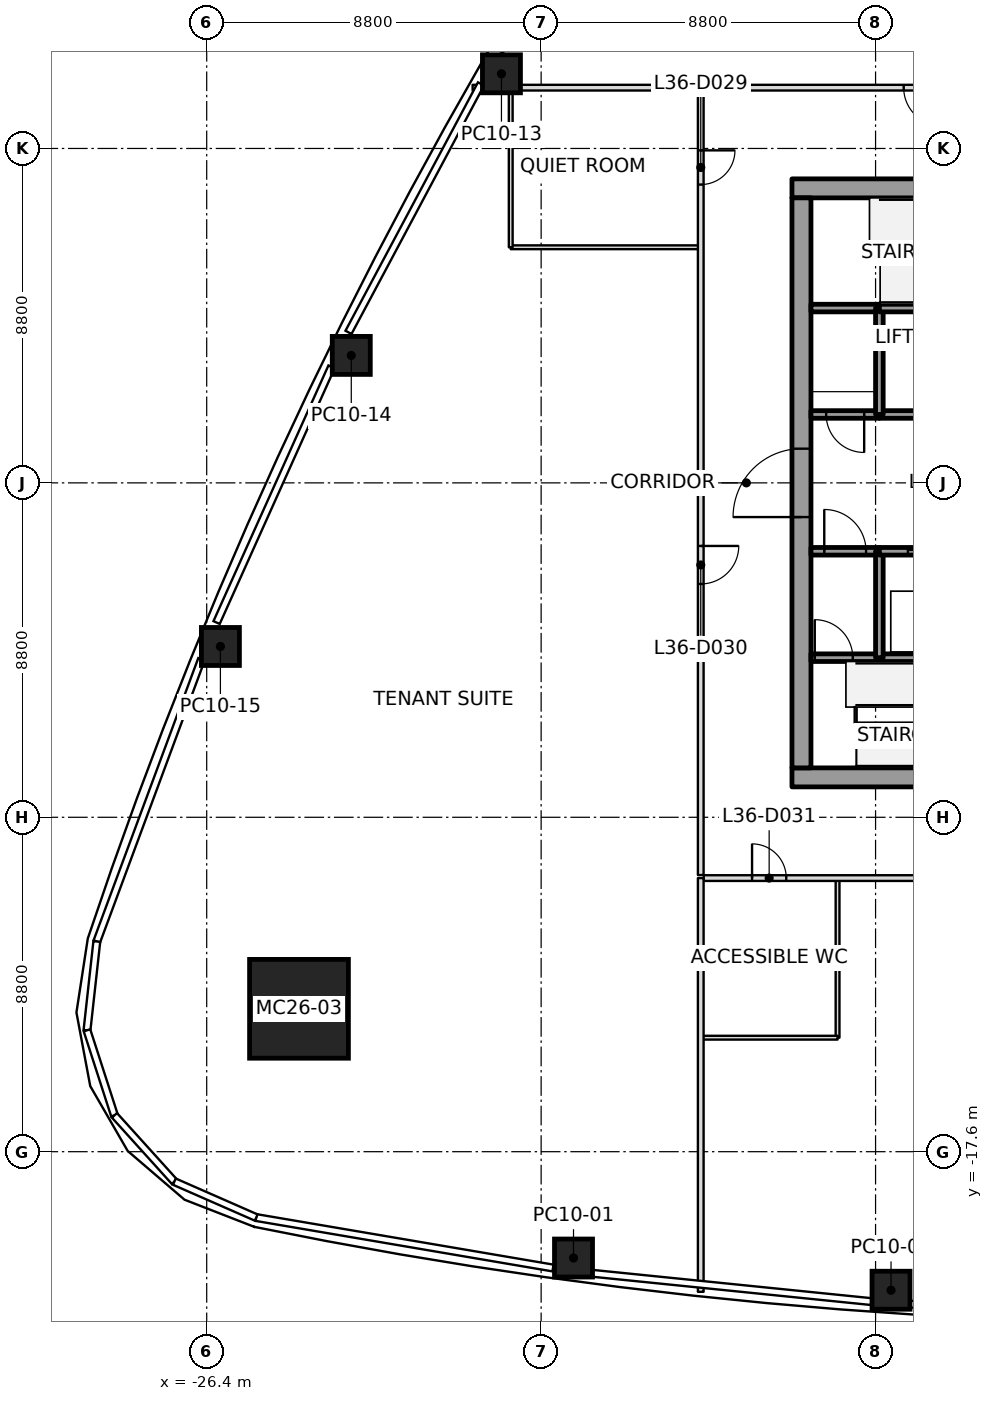
"""IFC4 building model, lengths in metres.
Left out: names, types, materials, properties, quantities, classifications, styles, units other than length and angle.
Written with IfcOpenShell. Run it as: python <this file> out.ifc"""

import sys

from ifc_helpers import new_model, si_unit, direction, frame, frame_2d, origin, origin_2d, place, context, subcontext, project, spatial, rectangle, extrude, element, fill, save


model = new_model("IFC4")
c1 = context("Model", 3, precision=1e-05, world=origin(), true_north=direction((0.0, 1.0)))
c2 = subcontext(c1, "Body", "Model", "MODEL_VIEW")
j1 = project(units=[si_unit("LENGTHUNIT", "METRE"), si_unit("PLANEANGLEUNIT", "RADIAN")], contexts=[c1])
p1 = place(None, origin())
s1 = spatial("IfcSite", under=j1, at=p1, CompositionType="ELEMENT")
p2 = place(p1, origin())
s2 = spatial("IfcBuilding", under=s1, at=p2, CompositionType="ELEMENT")
p3 = place(p2, frame((0.0, 0.0, 165.8)))
s3 = spatial("IfcBuildingStorey", under=s2, at=p3, CompositionType="ELEMENT", Elevation=165.8)
p4 = place(p3, frame((-23.972, -13.84, 0.0), z_axis=(0.02806141744, 0.01622681965, 0.999474485505), x_axis=(0.999606200887, -0.000455526946, -0.028057719863)))
e1 = element("IfcColumn", 1, at=p4, inside=s3, PredefinedType="COLUMN", context=c2, shape_type="SweptSolid", body=[
    extrude(rectangle(XDim=2.6, YDim=2.6, at=origin_2d()), origin(), (0.0, 0.0, 1.0), 4.002),
])
p5 = place(p3, frame((-16.748, -20.398, 0.0), z_axis=(0.017696459735, 0.010434809016, 0.999788952766), x_axis=(-0.990776036146, 0.134545840015, 0.016132672842)))
e2 = element("IfcColumn", 2, at=p5, inside=s3, PredefinedType="COLUMN", context=c2, shape_type="SweptSolid", body=[
    extrude(rectangle(XDim=1.0, YDim=1.0, at=origin_2d()), origin(), (0.0, 0.0, 1.0), 4.001),
])
p6 = place(p3, frame((-8.393, -21.246, 0.0), z_axis=(0.008788174922, 0.01116830563, 0.999899013366), x_axis=(-0.997691697618, 0.067431644192, 0.008015601414)))
e3 = element("IfcColumn", 3, at=p6, inside=s3, PredefinedType="COLUMN", context=c2, shape_type="SweptSolid", body=[
    extrude(rectangle(XDim=1.0, YDim=1.0, at=origin_2d()), origin(), (0.0, 0.0, 1.0), 4.0),
])
p7 = place(p3, frame((-18.644, 10.764, 0.0), z_axis=(0.009887049298, -0.00573692984, 0.999934664812), x_axis=(0.499975560967, 0.866039512843, 2.5126546e-05)))
e4 = element("IfcColumn", 4, at=p7, inside=s3, PredefinedType="COLUMN", context=c2, shape_type="SweptSolid", body=[
    extrude(rectangle(XDim=1.0, YDim=1.0, at=origin_2d()), origin(), (0.0, 0.0, 1.0), 4.0),
])
p8 = place(p3, frame((-22.596, 3.354, 0.0), z_axis=(0.014158708123, 0.002013954173, 0.999897732257), x_axis=(0.440504608639, 0.897714295087, -0.008045754452)))
e5 = element("IfcColumn", 5, at=p8, inside=s3, PredefinedType="COLUMN", context=c2, shape_type="SweptSolid", body=[
    extrude(rectangle(XDim=1.0, YDim=1.0, at=origin_2d()), origin(), (0.0, 0.0, 1.0), 4.0),
])
p9 = place(p3, frame((-26.04, -4.305, 0.0), z_axis=(0.017879535448, 0.010068680372, 0.999789449778), x_axis=(0.379037047043, 0.925241495115, -0.016096356291)))
e6 = element("IfcColumn", 6, at=p9, inside=s3, PredefinedType="COLUMN", context=c2, shape_type="SweptSolid", body=[
    extrude(rectangle(XDim=1.0, YDim=1.0, at=origin_2d()), origin(), (0.0, 0.0, 1.0), 4.001),
])
p10 = place(p3, frame((-11.0, -7.75, 0.0), z_axis=(0.0, 0.0, 1.0), x_axis=(1.0, 0.0, 0.0)))
e7 = element("IfcWall", 7, at=p10, inside=s3, PredefinedType="SHEAR", context=c2, shape_type="SweptSolid", body=[
    extrude(rectangle(XDim=22.0, YDim=0.5, at=frame_2d((11.0, 0.0))), origin(), (0.0, 0.0, 1.0), 4.0),
])
p11 = place(p10, frame((10.45, 0.0, 0.0)))
e8 = element("IfcOpeningElement", 8, at=p11, cuts=e7, PredefinedType="OPENING", context=c2, shape_type="SweptSolid", body=[
    extrude(rectangle(XDim=1.1, YDim=2.1, at=frame_2d((0.55, 1.05))), frame((0.0, 0.25, 0.0), z_axis=(0.0, -1.0, 0.0), x_axis=(1.0, 0.0, 0.0)), (0.0, 0.0, 1.0), 0.5),
])
p12 = place(p3, frame((-11.0, 7.75, 0.0), z_axis=(0.0, 0.0, 1.0), x_axis=(1.0, 0.0, 0.0)))
e9 = element("IfcWall", 9, at=p12, inside=s3, PredefinedType="SHEAR", context=c2, shape_type="SweptSolid", body=[
    extrude(rectangle(XDim=22.0, YDim=0.5, at=frame_2d((11.0, 0.0))), origin(), (0.0, 0.0, 1.0), 4.0),
])
p13 = place(p12, frame((10.45, 0.0, 0.0)))
e10 = element("IfcOpeningElement", 10, at=p13, cuts=e9, PredefinedType="OPENING", context=c2, shape_type="SweptSolid", body=[
    extrude(rectangle(XDim=1.1, YDim=2.1, at=frame_2d((0.55, 1.05))), frame((0.0, 0.25, 0.0), z_axis=(0.0, -1.0, 0.0), x_axis=(1.0, 0.0, 0.0)), (0.0, 0.0, 1.0), 0.5),
])
p14 = place(p3, frame((-10.75, -7.5, 0.0), z_axis=(0.0, 0.0, 1.0), x_axis=(0.0, 1.0, 0.0)))
e11 = element("IfcWall", 11, at=p14, inside=s3, PredefinedType="SHEAR", context=c2, shape_type="SweptSolid", body=[
    extrude(rectangle(XDim=15.0, YDim=0.5, at=frame_2d((7.5, 0.0))), origin(), (0.0, 0.0, 1.0), 4.0),
])
p15 = place(p14, frame((6.6, 0.0, 0.0)))
e12 = element("IfcOpeningElement", 12, at=p15, cuts=e11, PredefinedType="OPENING", context=c2, shape_type="SweptSolid", body=[
    extrude(rectangle(XDim=1.8, YDim=2.1, at=frame_2d((0.9, 1.05))), frame((0.0, 0.25, 0.0), z_axis=(0.0, -1.0, 0.0), x_axis=(1.0, 0.0, 0.0)), (0.0, 0.0, 1.0), 0.5),
])
p16 = place(p3, frame((-10.5, -4.6, 0.0), z_axis=(0.0, 0.0, 1.0), x_axis=(1.0, 0.0, 0.0)))
e13 = element("IfcWall", 13, at=p16, inside=s3, PredefinedType="SOLIDWALL", context=c2, shape_type="SweptSolid", body=[
    extrude(rectangle(XDim=1.8, YDim=0.2, at=frame_2d((0.9, 0.0))), origin(), (0.0, 0.0, 1.0), 3.85),
])
p17 = place(p16, frame((0.1, 0.0, 0.0)))
e14 = element("IfcOpeningElement", 14, at=p17, cuts=e13, PredefinedType="OPENING", context=c2, shape_type="SweptSolid", body=[
    extrude(rectangle(XDim=1.0, YDim=2.1, at=frame_2d((0.5, 1.05))), frame((0.0, 0.1, 0.0), z_axis=(0.0, -1.0, 0.0), x_axis=(1.0, 0.0, 0.0)), (0.0, 0.0, 1.0), 0.2),
])
p18 = place(p3, frame((-10.5, -1.8, 0.0), z_axis=(0.0, 0.0, 1.0), x_axis=(1.0, 0.0, 0.0)))
e15 = element("IfcWall", 15, at=p18, inside=s3, PredefinedType="SOLIDWALL", context=c2, shape_type="SweptSolid", body=[
    extrude(rectangle(XDim=1.8, YDim=0.2, at=frame_2d((0.9, 0.0))), origin(), (0.0, 0.0, 1.0), 3.85),
])
p19 = place(p18, frame((0.35, 0.0, 0.0)))
e16 = element("IfcOpeningElement", 16, at=p19, cuts=e15, PredefinedType="OPENING", context=c2, shape_type="SweptSolid", body=[
    extrude(rectangle(XDim=1.1, YDim=2.1, at=frame_2d((0.55, 1.05))), frame((0.0, 0.1, 0.0), z_axis=(0.0, -1.0, 0.0), x_axis=(1.0, 0.0, 0.0)), (0.0, 0.0, 1.0), 0.2),
])
p20 = place(p3, frame((-8.7, 1.8, 0.0), z_axis=(0.0, 0.0, 1.0), x_axis=(-1.0, 0.0, 0.0)))
e17 = element("IfcWall", 17, at=p20, inside=s3, PredefinedType="SOLIDWALL", context=c2, shape_type="SweptSolid", body=[
    extrude(rectangle(XDim=1.8, YDim=0.2, at=frame_2d((0.9, 0.0))), origin(), (0.0, 0.0, 1.0), 3.85),
])
p21 = place(p20, frame((0.4, 0.0, 0.0)))
e18 = element("IfcOpeningElement", 18, at=p21, cuts=e17, PredefinedType="OPENING", context=c2, shape_type="SweptSolid", body=[
    extrude(rectangle(XDim=1.0, YDim=2.1, at=frame_2d((0.5, 1.05))), frame((0.0, 0.1, 0.0), z_axis=(0.0, -1.0, 0.0), x_axis=(1.0, 0.0, 0.0)), (0.0, 0.0, 1.0), 0.2),
])
p22 = place(p3, frame((-8.7, 4.6, 0.0), z_axis=(0.0, 0.0, 1.0), x_axis=(-1.0, 0.0, 0.0)))
e19 = element("IfcWall", 19, at=p22, inside=s3, PredefinedType="SOLIDWALL", context=c2, shape_type="SweptSolid", body=[
    extrude(rectangle(XDim=1.8, YDim=0.2, at=frame_2d((0.9, 0.0))), origin(), (0.0, 0.0, 1.0), 3.85),
])
p23 = place(p3, frame((-8.7, -4.6, 0.0), z_axis=(0.0, 0.0, 1.0), x_axis=(1.0, 0.0, 0.0)))
e20 = element("IfcWall", 20, at=p23, inside=s3, PredefinedType="SOLIDWALL", context=c2, shape_type="SweptSolid", body=[
    extrude(rectangle(XDim=2.6, YDim=0.2, at=frame_2d((1.3, 0.0))), origin(), (0.0, 0.0, 1.0), 3.85),
])
p24 = place(p3, frame((-8.7, -4.6, 0.0), z_axis=(0.0, 0.0, 1.0), x_axis=(0.0, 1.0, 0.0)))
e21 = element("IfcWall", 21, at=p24, inside=s3, PredefinedType="SOLIDWALL", context=c2, shape_type="SweptSolid", body=[
    extrude(rectangle(XDim=2.8, YDim=0.2, at=frame_2d((1.4, 0.0))), origin(), (0.0, 0.0, 1.0), 3.85),
])
p25 = place(p3, frame((-8.7, -1.8, 0.0), z_axis=(0.0, 0.0, 1.0), x_axis=(1.0, 0.0, 0.0)))
e22 = element("IfcWall", 22, at=p25, inside=s3, PredefinedType="SOLIDWALL", context=c2, shape_type="SweptSolid", body=[
    extrude(rectangle(XDim=2.6, YDim=0.2, at=frame_2d((1.3, 0.0))), origin(), (0.0, 0.0, 1.0), 3.85),
])
p26 = place(p25, frame((0.75, 0.0, 0.0)))
e23 = element("IfcOpeningElement", 23, at=p26, cuts=e22, PredefinedType="OPENING", context=c2, shape_type="SweptSolid", body=[
    extrude(rectangle(XDim=1.1, YDim=2.1, at=frame_2d((0.55, 1.05))), frame((0.0, 0.1, 0.0), z_axis=(0.0, -1.0, 0.0), x_axis=(1.0, 0.0, 0.0)), (0.0, 0.0, 1.0), 0.2),
])
p27 = place(p3, frame((-6.1, 1.8, 0.0), z_axis=(0.0, 0.0, 1.0), x_axis=(-1.0, 0.0, 0.0)))
e24 = element("IfcWall", 24, at=p27, inside=s3, PredefinedType="SOLIDWALL", context=c2, shape_type="SweptSolid", body=[
    extrude(rectangle(XDim=2.6, YDim=0.2, at=frame_2d((1.3, 0.0))), origin(), (0.0, 0.0, 1.0), 3.85),
])
p28 = place(p3, frame((-8.7, 1.8, 0.0), z_axis=(0.0, 0.0, 1.0), x_axis=(0.0, 1.0, 0.0)))
e25 = element("IfcWall", 25, at=p28, inside=s3, PredefinedType="SOLIDWALL", context=c2, shape_type="SweptSolid", body=[
    extrude(rectangle(XDim=2.8, YDim=0.2, at=frame_2d((1.4, 0.0))), origin(), (0.0, 0.0, 1.0), 3.85),
])
p29 = place(p3, frame((-6.1, 4.6, 0.0), z_axis=(0.0, 0.0, 1.0), x_axis=(-1.0, 0.0, 0.0)))
e26 = element("IfcWall", 26, at=p29, inside=s3, PredefinedType="SOLIDWALL", context=c2, shape_type="SweptSolid", body=[
    extrude(rectangle(XDim=2.6, YDim=0.2, at=frame_2d((1.3, 0.0))), origin(), (0.0, 0.0, 1.0), 3.85),
])
p30 = place(p3, frame((-13.4, 10.4, 0.0), z_axis=(0.0, 0.0, 1.0), x_axis=(-1.0, 0.0, 0.0)))
e27 = element("IfcWall", 27, at=p30, inside=s3, PredefinedType="PARTITIONING", context=c2, shape_type="SweptSolid", body=[
    extrude(rectangle(XDim=6.003, YDim=0.15, at=frame_2d((3.001, 0.0))), origin(), (0.0, 0.0, 1.0), 3.234),
])
p31 = place(p3, frame((-13.4, -10.4, 0.0), z_axis=(0.0, 0.0, 1.0), x_axis=(0.0, -1.0, 0.0)))
e28 = element("IfcWall", 28, at=p31, inside=s3, PredefinedType="PARTITIONING", context=c2, shape_type="SweptSolid", body=[
    extrude(rectangle(XDim=10.888, YDim=0.15, at=frame_2d((5.444, 0.0))), origin(), (0.0, 0.0, 1.0), 3.234),
])
p32 = place(p3, frame((-13.4, 10.32, 0.0), z_axis=(0.0, 0.0, 1.0), x_axis=(0.0, -1.0, 0.0)))
e29 = element("IfcWall", 29, at=p32, inside=s3, PredefinedType="PARTITIONING", context=c2, shape_type="SweptSolid", body=[
    extrude(rectangle(XDim=20.64, YDim=0.15, at=frame_2d((10.32, 0.0))), origin(), (0.0, 0.0, 1.0), 3.166),
])
p33 = place(p32, frame((1.57, 0.0, 0.0)))
e30 = element("IfcOpeningElement", 30, at=p33, cuts=e29, PredefinedType="OPENING", context=c2, shape_type="SweptSolid", body=[
    extrude(rectangle(XDim=0.9, YDim=2.1, at=frame_2d((0.45, 1.05))), frame((0.0, 0.075, 0.0), z_axis=(0.0, -1.0, 0.0), x_axis=(1.0, 0.0, 0.0)), (0.0, 0.0, 1.0), 0.15),
])
p34 = place(p32, frame((11.98, 0.0, 0.0)))
e31 = element("IfcOpeningElement", 31, at=p34, cuts=e29, PredefinedType="OPENING", context=c2, shape_type="SweptSolid", body=[
    extrude(rectangle(XDim=1.0, YDim=2.1, at=frame_2d((0.5, 1.05))), frame((0.0, 0.075, 0.0), z_axis=(0.0, -1.0, 0.0), x_axis=(1.0, 0.0, 0.0)), (0.0, 0.0, 1.0), 0.15),
])
p35 = place(p3, frame((-13.32, -10.4, 0.0), z_axis=(0.0, 0.0, 1.0), x_axis=(1.0, 0.0, 0.0)))
e32 = element("IfcWall", 32, at=p35, inside=s3, PredefinedType="PARTITIONING", context=c2, shape_type="SweptSolid", body=[
    extrude(rectangle(XDim=26.64, YDim=0.15, at=frame_2d((13.32, 0.0))), origin(), (0.0, 0.0, 1.0), 3.317),
])
p36 = place(p35, frame((1.27, 0.0, 0.0)))
e33 = element("IfcOpeningElement", 33, at=p36, cuts=e32, PredefinedType="OPENING", context=c2, shape_type="SweptSolid", body=[
    extrude(rectangle(XDim=0.9, YDim=2.1, at=frame_2d((0.45, 1.05))), frame((0.0, 0.075, 0.0), z_axis=(0.0, -1.0, 0.0), x_axis=(1.0, 0.0, 0.0)), (0.0, 0.0, 1.0), 0.15),
])
p37 = place(p35, frame((9.67, 0.0, 0.0)))
e34 = element("IfcOpeningElement", 34, at=p37, cuts=e32, PredefinedType="OPENING", context=c2, shape_type="SweptSolid", body=[
    extrude(rectangle(XDim=1.0, YDim=2.1, at=frame_2d((0.5, 1.05))), frame((0.0, 0.075, 0.0), z_axis=(0.0, -1.0, 0.0), x_axis=(1.0, 0.0, 0.0)), (0.0, 0.0, 1.0), 0.15),
])
p38 = place(p35, frame((18.77, 0.0, 0.0)))
e35 = element("IfcOpeningElement", 35, at=p38, cuts=e32, PredefinedType="OPENING", context=c2, shape_type="SweptSolid", body=[
    extrude(rectangle(XDim=0.9, YDim=2.1, at=frame_2d((0.45, 1.05))), frame((0.0, 0.075, 0.0), z_axis=(0.0, -1.0, 0.0), x_axis=(1.0, 0.0, 0.0)), (0.0, 0.0, 1.0), 0.15),
])
p39 = place(p35, frame((23.77, 0.0, 0.0)))
e36 = element("IfcOpeningElement", 36, at=p39, cuts=e32, PredefinedType="OPENING", context=c2, shape_type="SweptSolid", body=[
    extrude(rectangle(XDim=1.0, YDim=2.1, at=frame_2d((0.5, 1.05))), frame((0.0, 0.075, 0.0), z_axis=(0.0, -1.0, 0.0), x_axis=(1.0, 0.0, 0.0)), (0.0, 0.0, 1.0), 0.15),
])
p40 = place(p3, frame((13.32, 10.4, 0.0), z_axis=(0.0, 0.0, 1.0), x_axis=(-1.0, 0.0, 0.0)))
e37 = element("IfcWall", 37, at=p40, inside=s3, PredefinedType="PARTITIONING", context=c2, shape_type="SweptSolid", body=[
    extrude(rectangle(XDim=26.64, YDim=0.15, at=frame_2d((13.32, 0.0))), origin(), (0.0, 0.0, 1.0), 3.166),
])
p41 = place(p40, frame((0.95, 0.0, 0.0)))
e38 = element("IfcOpeningElement", 38, at=p41, cuts=e37, PredefinedType="OPENING", context=c2, shape_type="SweptSolid", body=[
    extrude(rectangle(XDim=0.9, YDim=2.1, at=frame_2d((0.45, 1.05))), frame((0.0, 0.075, 0.0), z_axis=(0.0, -1.0, 0.0), x_axis=(1.0, 0.0, 0.0)), (0.0, 0.0, 1.0), 0.15),
])
p42 = place(p40, frame((6.36, 0.0, 0.0)))
e39 = element("IfcOpeningElement", 39, at=p42, cuts=e37, PredefinedType="OPENING", context=c2, shape_type="SweptSolid", body=[
    extrude(rectangle(XDim=1.0, YDim=2.1, at=frame_2d((0.5, 1.05))), frame((0.0, 0.075, 0.0), z_axis=(0.0, -1.0, 0.0), x_axis=(1.0, 0.0, 0.0)), (0.0, 0.0, 1.0), 0.15),
])
p43 = place(p40, frame((12.37, 0.0, 0.0)))
e40 = element("IfcOpeningElement", 40, at=p43, cuts=e37, PredefinedType="OPENING", context=c2, shape_type="SweptSolid", body=[
    extrude(rectangle(XDim=0.9, YDim=2.1, at=frame_2d((0.45, 1.05))), frame((0.0, 0.075, 0.0), z_axis=(0.0, -1.0, 0.0), x_axis=(1.0, 0.0, 0.0)), (0.0, 0.0, 1.0), 0.15),
])
p44 = place(p40, frame((20.38, 0.0, 0.0)))
e41 = element("IfcOpeningElement", 41, at=p44, cuts=e37, PredefinedType="OPENING", context=c2, shape_type="SweptSolid", body=[
    extrude(rectangle(XDim=1.0, YDim=2.1, at=frame_2d((0.5, 1.05))), frame((0.0, 0.075, 0.0), z_axis=(0.0, -1.0, 0.0), x_axis=(1.0, 0.0, 0.0)), (0.0, 0.0, 1.0), 0.15),
])
p45 = place(p3, frame((-13.43, 6.2, 0.0), z_axis=(0.0, 0.0, 1.0), x_axis=(-1.0, 0.0, 0.0)))
e42 = element("IfcWall", 42, at=p45, inside=s3, PredefinedType="PARTITIONING", context=c2, shape_type="SweptSolid", body=[
    extrude(rectangle(XDim=4.97, YDim=0.1, at=frame_2d((2.485, 0.0))), origin(), (0.0, 0.0, 1.0), 3.393),
])
p46 = place(p3, frame((-18.4, 6.2, 0.0), z_axis=(0.0, 0.0, 1.0), x_axis=(0.0, 1.0, 0.0)))
e43 = element("IfcWall", 43, at=p46, inside=s3, PredefinedType="PARTITIONING", context=c2, shape_type="SweptSolid", body=[
    extrude(rectangle(XDim=4.17, YDim=0.1, at=frame_2d((2.085, 0.0))), origin(), (0.0, 0.0, 1.0), 3.393),
])
p47 = place(p3, frame((-9.8, -10.43, 0.0), z_axis=(0.0, 0.0, 1.0), x_axis=(0.0, -1.0, 0.0)))
e44 = element("IfcWall", 44, at=p47, inside=s3, PredefinedType="PARTITIONING", context=c2, shape_type="SweptSolid", body=[
    extrude(rectangle(XDim=4.17, YDim=0.1, at=frame_2d((2.085, 0.0))), origin(), (0.0, 0.0, 1.0), 3.45),
])
p48 = place(p3, frame((-9.8, -14.6, 0.0), z_axis=(0.0, 0.0, 1.0), x_axis=(-1.0, 0.0, 0.0)))
e45 = element("IfcWall", 45, at=p48, inside=s3, PredefinedType="PARTITIONING", context=c2, shape_type="SweptSolid", body=[
    extrude(rectangle(XDim=3.57, YDim=0.1, at=frame_2d((1.785, 0.0))), origin(), (0.0, 0.0, 1.0), 3.393),
])
p49 = place(p44, origin())
e46 = element("IfcDoor", 46, at=p49, inside=s3, OperationType="SINGLE_SWING_RIGHT", PredefinedType="DOOR", context=c2, shape_type="SweptSolid", body=[
    extrude(rectangle(XDim=1.0, YDim=2.1, at=frame_2d((0.5, 1.05))), frame((0.0, 0.025, 0.0), z_axis=(0.0, -1.0, 0.0), x_axis=(1.0, 0.0, 0.0)), (0.0, 0.0, 1.0), 0.05),
])
fill(e41, e46)
p50 = place(p33, origin())
e47 = element("IfcDoor", 47, at=p50, inside=s3, OperationType="SINGLE_SWING_RIGHT", PredefinedType="DOOR", context=c2, shape_type="SweptSolid", body=[
    extrude(rectangle(XDim=0.9, YDim=2.1, at=frame_2d((0.45, 1.05))), frame((0.0, 0.025, 0.0), z_axis=(0.0, -1.0, 0.0), x_axis=(1.0, 0.0, 0.0)), (0.0, 0.0, 1.0), 0.05),
])
fill(e30, e47)
p51 = place(p34, origin())
e48 = element("IfcDoor", 48, at=p51, inside=s3, OperationType="SINGLE_SWING_LEFT", PredefinedType="DOOR", context=c2, shape_type="SweptSolid", body=[
    extrude(rectangle(XDim=1.0, YDim=2.1, at=frame_2d((0.5, 1.05))), frame((0.0, 0.025, 0.0), z_axis=(0.0, -1.0, 0.0), x_axis=(1.0, 0.0, 0.0)), (0.0, 0.0, 1.0), 0.05),
])
fill(e31, e48)
p52 = place(p36, origin())
e49 = element("IfcDoor", 49, at=p52, inside=s3, OperationType="SINGLE_SWING_RIGHT", PredefinedType="DOOR", context=c2, shape_type="SweptSolid", body=[
    extrude(rectangle(XDim=0.9, YDim=2.1, at=frame_2d((0.45, 1.05))), frame((0.0, 0.025, 0.0), z_axis=(0.0, -1.0, 0.0), x_axis=(1.0, 0.0, 0.0)), (0.0, 0.0, 1.0), 0.05),
])
fill(e33, e49)
p53 = place(p26, origin())
e50 = element("IfcDoor", 50, at=p53, inside=s3, OperationType="SLIDING_TO_LEFT", PredefinedType="DOOR", context=c2, shape_type="SweptSolid", body=[
    extrude(rectangle(XDim=1.1, YDim=2.1, at=frame_2d((0.55, 1.05))), frame((0.0, 0.025, 0.0), z_axis=(0.0, -1.0, 0.0), x_axis=(1.0, 0.0, 0.0)), (0.0, 0.0, 1.0), 0.05),
])
fill(e23, e50)
p54 = place(p19, origin())
e51 = element("IfcDoor", 51, at=p54, inside=s3, OperationType="SINGLE_SWING_RIGHT", PredefinedType="DOOR", context=c2, shape_type="SweptSolid", body=[
    extrude(rectangle(XDim=1.1, YDim=2.1, at=frame_2d((0.55, 1.05))), frame((0.0, 0.025, 0.0), z_axis=(0.0, -1.0, 0.0), x_axis=(1.0, 0.0, 0.0)), (0.0, 0.0, 1.0), 0.05),
])
fill(e16, e51)
p55 = place(p21, origin())
e52 = element("IfcDoor", 52, at=p55, inside=s3, OperationType="SINGLE_SWING_RIGHT", PredefinedType="DOOR", context=c2, shape_type="SweptSolid", body=[
    extrude(rectangle(XDim=1.0, YDim=2.1, at=frame_2d((0.5, 1.05))), frame((0.0, 0.025, 0.0), z_axis=(0.0, -1.0, 0.0), x_axis=(1.0, 0.0, 0.0)), (0.0, 0.0, 1.0), 0.05),
])
fill(e18, e52)
p56 = place(p17, origin())
e53 = element("IfcDoor", 53, at=p56, inside=s3, OperationType="SINGLE_SWING_LEFT", PredefinedType="DOOR", context=c2, shape_type="SweptSolid", body=[
    extrude(rectangle(XDim=1.0, YDim=2.1, at=frame_2d((0.5, 1.05))), frame((0.0, 0.025, 0.0), z_axis=(0.0, -1.0, 0.0), x_axis=(1.0, 0.0, 0.0)), (0.0, 0.0, 1.0), 0.05),
])
fill(e14, e53)
p57 = place(p15, origin())
e54 = element("IfcDoor", 54, at=p57, inside=s3, OperationType="DOUBLE_DOOR_SINGLE_SWING", PredefinedType="DOOR", context=c2, shape_type="SweptSolid", body=[
    extrude(rectangle(XDim=1.8, YDim=2.1, at=frame_2d((0.9, 1.05))), frame((0.0, 0.025, 0.0), z_axis=(0.0, -1.0, 0.0), x_axis=(1.0, 0.0, 0.0)), (0.0, 0.0, 1.0), 0.05),
])
fill(e12, e54)
save(model, sys.argv[1])
